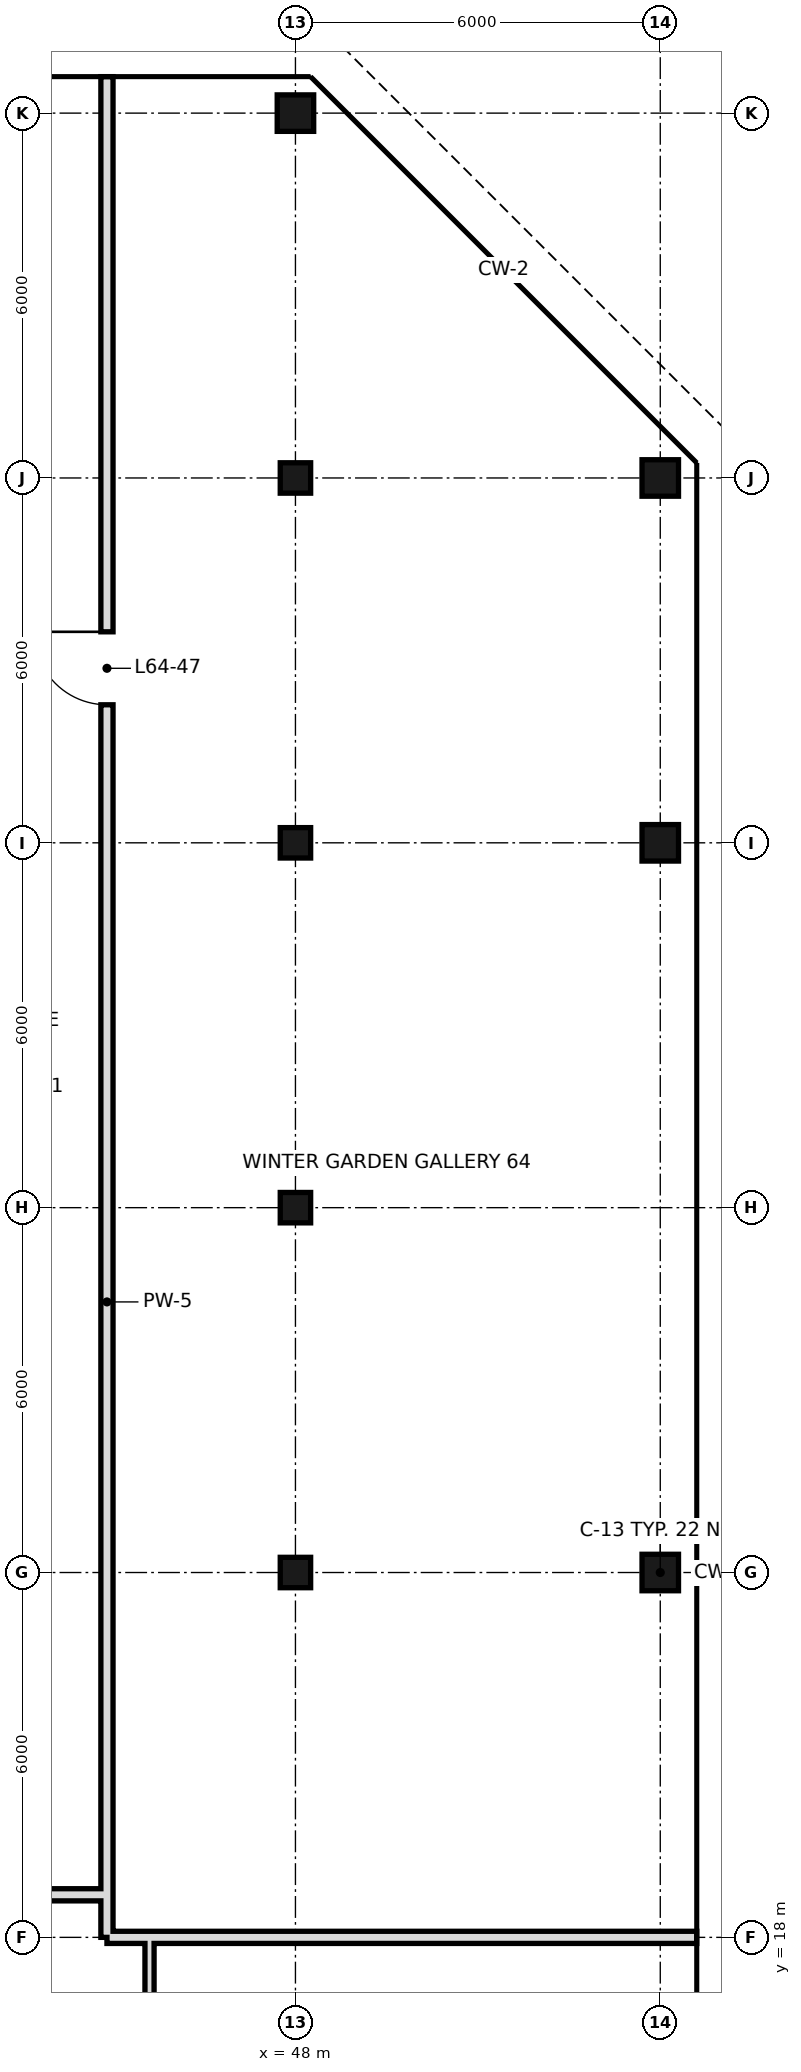
"""IFC4 building model, lengths in metres.
Left out: names, types, materials, properties, quantities, classifications, styles, units other than length and angle.
Written with IfcOpenShell. Run it as: python <this file> out.ifc"""

import sys

from ifc_helpers import new_model, si_unit, direction, frame, frame_2d, origin, origin_2d, place, context, subcontext, project, spatial, rectangle, hollow_rectangle, extrude, element, fill, save


model = new_model("IFC4")
c1 = context("Model", 3, precision=1e-05, world=origin(), true_north=direction((0.0, 1.0)))
c2 = subcontext(c1, "Body", "Model", "MODEL_VIEW")
j1 = project(units=[si_unit("LENGTHUNIT", "METRE"), si_unit("PLANEANGLEUNIT", "RADIAN")], contexts=[c1])
p1 = place(None, origin())
s1 = spatial("IfcSite", under=j1, at=p1, CompositionType="ELEMENT")
p2 = place(p1, origin())
s2 = spatial("IfcBuilding", under=s1, at=p2, CompositionType="ELEMENT")
p3 = place(p2, frame((0.0, 0.0, 270.2)))
s3 = spatial("IfcBuildingStorey", under=s2, at=p3, CompositionType="ELEMENT", Elevation=270.2)
for number, where, z_axis, x_axis in (
    (1, (48.0, 24.0, 0.0), (0.0, 0.0, 1.0), (1.0, 0.0, 0.0)),
    (2, (48.0, 30.0, 0.0), (0.0, 0.0, 1.0), (1.0, 0.0, 0.0)),
    (3, (48.0, 36.0, 0.0), (0.0, 0.0, 1.0), (1.0, 0.0, 0.0)),
    (4, (48.0, 42.0, 0.0), (0.0, 0.0, 1.0), (1.0, 0.0, 0.0)),
):
    element("IfcColumn", number, at=place(p3, frame(where, z_axis=z_axis, x_axis=x_axis)), inside=s3, PredefinedType="COLUMN", context=c2, shape_type="SweptSolid", body=[
        extrude(hollow_rectangle(XDim=0.5, YDim=0.5, WallThickness=0.025, at=origin_2d()), origin(), (0.0, 0.0, 1.0), 3.6),
    ])
for number, where, z_axis, x_axis in (
    (5, (48.0, 48.0, 0.0), (0.0, 0.0, 1.0), (1.0, 0.0, 0.0)),
    (6, (54.0, 24.0, 0.0), (0.0, 0.0, 1.0), (1.0, 0.0, 0.0)),
    (7, (54.0, 36.0, 0.0), (0.0, 0.0, 1.0), (1.0, 0.0, 0.0)),
    (8, (54.0, 42.0, 0.0), (0.0, 0.0, 1.0), (1.0, 0.0, 0.0)),
):
    element("IfcColumn", number, at=place(p3, frame(where, z_axis=z_axis, x_axis=x_axis)), inside=s3, PredefinedType="COLUMN", context=c2, shape_type="SweptSolid", body=[
        extrude(hollow_rectangle(XDim=0.6, YDim=0.6, WallThickness=0.028, at=origin_2d()), origin(), (0.0, 0.0, 1.0), 3.6),
    ])
p4 = place(p3, frame((44.9, 18.0, 0.0), z_axis=(0.0, 0.0, 1.0), x_axis=(0.0, 1.0, 0.0)))
e9 = element("IfcWall", 9, at=p4, inside=s3, PredefinedType="SOLIDWALL", context=c2, shape_type="SweptSolid", body=[
    extrude(rectangle(XDim=30.6, YDim=0.2, at=frame_2d((15.3, 0.0))), origin(), (0.0, 0.0, 1.0), 2.72),
])
p5 = place(p4, frame((20.27, 0.0, 0.0)))
e10 = element("IfcOpeningElement", 10, at=p5, cuts=e9, PredefinedType="OPENING", context=c2, shape_type="SweptSolid", body=[
    extrude(rectangle(XDim=1.2, YDim=2.4, at=frame_2d((0.6, 1.2))), frame((0.0, 0.11, 0.0), z_axis=(0.0, -1.0, 0.0), x_axis=(1.0, 0.0, 0.0)), (0.0, 0.0, 1.0), 0.22),
])
p6 = place(p3, frame((45.6, 10.8, 0.0), z_axis=(0.0, 0.0, 1.0), x_axis=(0.0, 1.0, 0.0)))
e11 = element("IfcWall", 11, at=p6, inside=s3, PredefinedType="PARTITIONING", context=c2, shape_type="SweptSolid", body=[
    extrude(rectangle(XDim=7.2, YDim=0.15, at=frame_2d((3.6, 0.0))), origin(), (0.0, 0.0, 1.0), 3.42),
])
p7 = place(p3, frame((44.9, 18.0, 0.0), z_axis=(0.0, 0.0, 1.0), x_axis=(1.0, 0.0, 0.0)))
e12 = element("IfcWall", 12, at=p7, inside=s3, PredefinedType="SOLIDWALL", context=c2, shape_type="SweptSolid", body=[
    extrude(rectangle(XDim=9.7, YDim=0.2, at=frame_2d((4.85, 0.0))), origin(), (0.0, 0.0, 1.0), 2.72),
])
p8 = place(p3, frame((27.6, 18.7, 0.0), z_axis=(0.0, 0.0, 1.0), x_axis=(1.0, 0.0, 0.0)))
e13 = element("IfcWall", 13, at=p8, inside=s3, PredefinedType="SOLIDWALL", context=c2, shape_type="SweptSolid", body=[
    extrude(rectangle(XDim=17.3, YDim=0.2, at=frame_2d((8.65, 0.0))), origin(), (0.0, 0.0, 1.0), 2.72),
])
p9 = place(p8, frame((1.54, 0.0, 0.0)))
e14 = element("IfcOpeningElement", 14, at=p9, cuts=e13, PredefinedType="OPENING", context=c2, shape_type="SweptSolid", body=[
    extrude(rectangle(XDim=1.2, YDim=2.4, at=frame_2d((0.6, 1.2))), frame((0.0, 0.11, 0.0), z_axis=(0.0, -1.0, 0.0), x_axis=(1.0, 0.0, 0.0)), (0.0, 0.0, 1.0), 0.22),
])
p10 = place(p5, frame((1.2, 0.0, 0.0), z_axis=(0.0, 0.0, 1.0), x_axis=(-1.0, 0.0, 0.0)))
e15 = element("IfcDoor", 15, at=p10, inside=s3, OperationType="SINGLE_SWING_LEFT", PredefinedType="DOOR", context=c2, shape_type="SweptSolid", body=[
    extrude(rectangle(XDim=1.2, YDim=2.4, at=frame_2d((0.6, 1.2))), frame((0.0, 0.025, 0.0), z_axis=(0.0, -1.0, 0.0), x_axis=(1.0, 0.0, 0.0)), (0.0, 0.0, 1.0), 0.05),
])
fill(e10, e15)
save(model, sys.argv[1])
